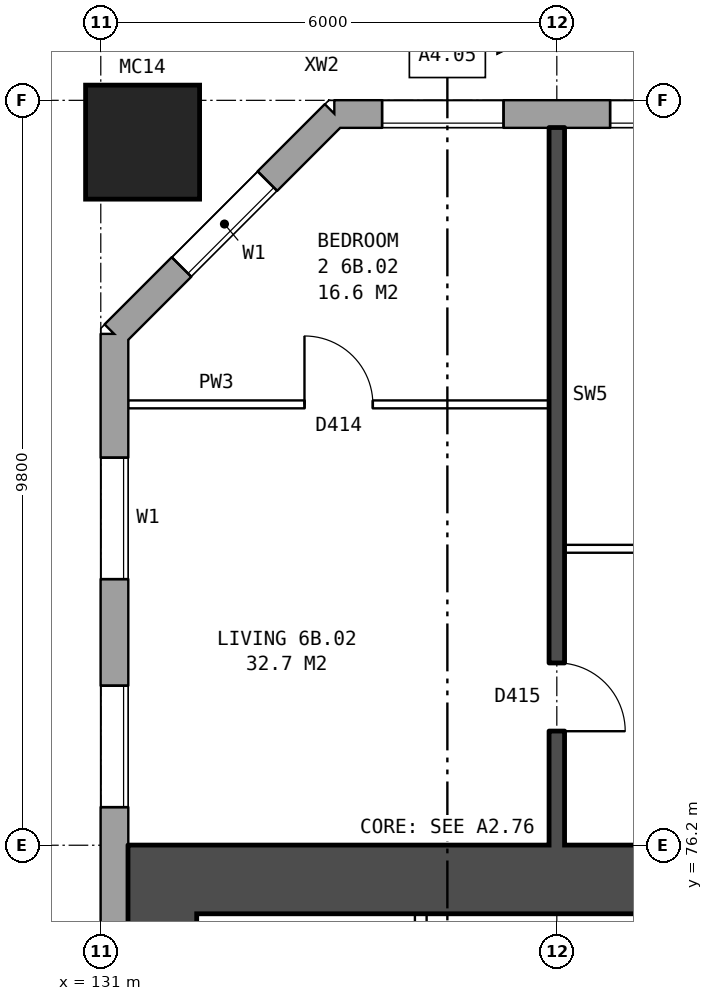
"""IFC4 building model, lengths in metres.
Left out: names, types, materials, properties, quantities, classifications, styles, units other than length and angle.
Written with IfcOpenShell. Run it as: python <this file> out.ifc"""

import sys

from ifc_helpers import new_model, si_unit, direction, frame, frame_2d, origin, origin_2d, place, context, subcontext, project, spatial, rectangle, hollow_rectangle, extrude, element, fill, save


model = new_model("IFC4")
c1 = context("Model", 3, precision=1e-05, world=origin(), true_north=direction((0.0, 1.0)))
c2 = subcontext(c1, "Body", "Model", "MODEL_VIEW")
j1 = project(units=[si_unit("LENGTHUNIT", "METRE"), si_unit("PLANEANGLEUNIT", "RADIAN")], contexts=[c1])
p1 = place(None, origin())
s1 = spatial("IfcSite", under=j1, at=p1, CompositionType="ELEMENT")
p2 = place(p1, origin())
s2 = spatial("IfcBuilding", under=s1, at=p2, CompositionType="ELEMENT")
p3 = place(p2, frame((0.0, 0.0, 25.7)))
s3 = spatial("IfcBuildingStorey", under=s2, at=p3, CompositionType="ELEMENT", Elevation=25.7)
p4 = place(p3, frame((131.55, 85.45, 0.0), z_axis=(0.0, 0.0, 1.0), x_axis=(1.0, 0.0, 0.0)))
e1 = element("IfcColumn", 1, at=p4, inside=s3, PredefinedType="COLUMN", context=c2, shape_type="SweptSolid", body=[
    extrude(hollow_rectangle(XDim=1.5, YDim=1.5, WallThickness=0.08, at=origin_2d()), origin(), (0.0, 0.0, 1.0), 3.1),
])
p5 = place(p3, frame((174.675, 85.82, 0.0), z_axis=(0.0, 0.0, 1.0), x_axis=(-1.0, 0.0, 0.0)))
e2 = element("IfcWall", 2, at=p5, inside=s3, PredefinedType="STANDARD", context=c2, shape_type="SweptSolid", body=[
    extrude(rectangle(XDim=40.601, YDim=0.36, at=frame_2d((20.3, 0.0))), origin(), (0.0, 0.0, 1.0), 2.85),
])
p6 = place(p5, frame((2.375, 0.0, 0.8)))
e3 = element("IfcOpeningElement", 3, at=p6, cuts=e2, PredefinedType="OPENING", context=c2, shape_type="SweptSolid", body=[
    extrude(rectangle(XDim=1.6, YDim=1.8, at=frame_2d((0.8, 0.9))), frame((0.0, 0.19, 0.0), z_axis=(0.0, -1.0, 0.0), x_axis=(1.0, 0.0, 0.0)), (0.0, 0.0, 1.0), 0.38),
])
p7 = place(p5, frame((4.275, 0.0, 0.8)))
e4 = element("IfcOpeningElement", 4, at=p7, cuts=e2, PredefinedType="OPENING", context=c2, shape_type="SweptSolid", body=[
    extrude(rectangle(XDim=1.2, YDim=1.8, at=frame_2d((0.6, 0.9))), frame((0.0, 0.19, 0.0), z_axis=(0.0, -1.0, 0.0), x_axis=(1.0, 0.0, 0.0)), (0.0, 0.0, 1.0), 0.38),
])
p8 = place(p5, frame((8.025, 0.0, 0.8)))
e5 = element("IfcOpeningElement", 5, at=p8, cuts=e2, PredefinedType="OPENING", context=c2, shape_type="SweptSolid", body=[
    extrude(rectangle(XDim=0.8, YDim=0.9, at=frame_2d((0.4, 0.45))), frame((0.0, 0.19, 0.0), z_axis=(0.0, -1.0, 0.0), x_axis=(1.0, 0.0, 0.0)), (0.0, 0.0, 1.0), 0.38),
])
p9 = place(p5, frame((11.375, 0.0, 0.8)))
e6 = element("IfcOpeningElement", 6, at=p9, cuts=e2, PredefinedType="OPENING", context=c2, shape_type="SweptSolid", body=[
    extrude(rectangle(XDim=1.6, YDim=1.8, at=frame_2d((0.8, 0.9))), frame((0.0, 0.19, 0.0), z_axis=(0.0, -1.0, 0.0), x_axis=(1.0, 0.0, 0.0)), (0.0, 0.0, 1.0), 0.38),
])
p10 = place(p5, frame((14.375, 0.0, 0.8)))
e7 = element("IfcOpeningElement", 7, at=p10, cuts=e2, PredefinedType="OPENING", context=c2, shape_type="SweptSolid", body=[
    extrude(rectangle(XDim=1.6, YDim=1.8, at=frame_2d((0.8, 0.9))), frame((0.0, 0.19, 0.0), z_axis=(0.0, -1.0, 0.0), x_axis=(1.0, 0.0, 0.0)), (0.0, 0.0, 1.0), 0.38),
])
p11 = place(p5, frame((17.375, 0.0, 0.8)))
e8 = element("IfcOpeningElement", 8, at=p11, cuts=e2, PredefinedType="OPENING", context=c2, shape_type="SweptSolid", body=[
    extrude(rectangle(XDim=1.6, YDim=1.8, at=frame_2d((0.8, 0.9))), frame((0.0, 0.19, 0.0), z_axis=(0.0, -1.0, 0.0), x_axis=(1.0, 0.0, 0.0)), (0.0, 0.0, 1.0), 0.38),
])
p12 = place(p5, frame((20.375, 0.0, 0.8)))
e9 = element("IfcOpeningElement", 9, at=p12, cuts=e2, PredefinedType="OPENING", context=c2, shape_type="SweptSolid", body=[
    extrude(rectangle(XDim=1.6, YDim=1.8, at=frame_2d((0.8, 0.9))), frame((0.0, 0.19, 0.0), z_axis=(0.0, -1.0, 0.0), x_axis=(1.0, 0.0, 0.0)), (0.0, 0.0, 1.0), 0.38),
])
p13 = place(p5, frame((23.375, 0.0, 0.8)))
e10 = element("IfcOpeningElement", 10, at=p13, cuts=e2, PredefinedType="OPENING", context=c2, shape_type="SweptSolid", body=[
    extrude(rectangle(XDim=1.6, YDim=1.8, at=frame_2d((0.8, 0.9))), frame((0.0, 0.19, 0.0), z_axis=(0.0, -1.0, 0.0), x_axis=(1.0, 0.0, 0.0)), (0.0, 0.0, 1.0), 0.38),
])
p14 = place(p5, frame((26.375, 0.0, 0.8)))
e11 = element("IfcOpeningElement", 11, at=p14, cuts=e2, PredefinedType="OPENING", context=c2, shape_type="SweptSolid", body=[
    extrude(rectangle(XDim=1.6, YDim=1.8, at=frame_2d((0.8, 0.9))), frame((0.0, 0.19, 0.0), z_axis=(0.0, -1.0, 0.0), x_axis=(1.0, 0.0, 0.0)), (0.0, 0.0, 1.0), 0.38),
])
p15 = place(p5, frame((29.375, 0.0, 0.8)))
e12 = element("IfcOpeningElement", 12, at=p15, cuts=e2, PredefinedType="OPENING", context=c2, shape_type="SweptSolid", body=[
    extrude(rectangle(XDim=1.6, YDim=1.8, at=frame_2d((0.8, 0.9))), frame((0.0, 0.19, 0.0), z_axis=(0.0, -1.0, 0.0), x_axis=(1.0, 0.0, 0.0)), (0.0, 0.0, 1.0), 0.38),
])
p16 = place(p5, frame((31.875, 0.0, 0.8)))
e13 = element("IfcOpeningElement", 13, at=p16, cuts=e2, PredefinedType="OPENING", context=c2, shape_type="SweptSolid", body=[
    extrude(rectangle(XDim=0.6, YDim=0.9, at=frame_2d((0.3, 0.45))), frame((0.0, 0.19, 0.0), z_axis=(0.0, -1.0, 0.0), x_axis=(1.0, 0.0, 0.0)), (0.0, 0.0, 1.0), 0.38),
])
p17 = place(p5, frame((35.375, 0.0, 0.8)))
e14 = element("IfcOpeningElement", 14, at=p17, cuts=e2, PredefinedType="OPENING", context=c2, shape_type="SweptSolid", body=[
    extrude(rectangle(XDim=1.6, YDim=1.8, at=frame_2d((0.8, 0.9))), frame((0.0, 0.19, 0.0), z_axis=(0.0, -1.0, 0.0), x_axis=(1.0, 0.0, 0.0)), (0.0, 0.0, 1.0), 0.38),
])
p18 = place(p5, frame((38.375, 0.0, 0.8)))
e15 = element("IfcOpeningElement", 15, at=p18, cuts=e2, PredefinedType="OPENING", context=c2, shape_type="SweptSolid", body=[
    extrude(rectangle(XDim=1.6, YDim=1.8, at=frame_2d((0.8, 0.9))), frame((0.0, 0.19, 0.0), z_axis=(0.0, -1.0, 0.0), x_axis=(1.0, 0.0, 0.0)), (0.0, 0.0, 1.0), 0.38),
])
p19 = place(p5, frame((5.775, 0.0, 1.7)))
e16 = element("IfcOpeningElement", 16, at=p19, cuts=e2, PredefinedType="OPENING", context=c2, shape_type="SweptSolid", body=[
    extrude(rectangle(XDim=1.0, YDim=0.9, at=frame_2d((0.5, 0.45))), frame((0.0, 0.19, 0.0), z_axis=(0.0, -1.0, 0.0), x_axis=(1.0, 0.0, 0.0)), (0.0, 0.0, 1.0), 0.38),
])
p20 = place(p5, frame((9.125, 0.0, 0.8)))
e17 = element("IfcOpeningElement", 17, at=p20, cuts=e2, PredefinedType="OPENING", context=c2, shape_type="SweptSolid", body=[
    extrude(rectangle(XDim=1.2, YDim=1.8, at=frame_2d((0.6, 0.9))), frame((0.0, 0.19, 0.0), z_axis=(0.0, -1.0, 0.0), x_axis=(1.0, 0.0, 0.0)), (0.0, 0.0, 1.0), 0.38),
])
p21 = place(p5, frame((33.825, 0.0, 1.7)))
e18 = element("IfcOpeningElement", 18, at=p21, cuts=e2, PredefinedType="OPENING", context=c2, shape_type="SweptSolid", body=[
    extrude(rectangle(XDim=1.2, YDim=0.9, at=frame_2d((0.6, 0.45))), frame((0.0, 0.19, 0.0), z_axis=(0.0, -1.0, 0.0), x_axis=(1.0, 0.0, 0.0)), (0.0, 0.0, 1.0), 0.38),
])
p22 = place(p3, frame((134.075, 85.82, 0.0), z_axis=(0.0, 0.0, 1.0), x_axis=(-0.707106781187, -0.707106781187, 0.0)))
e19 = element("IfcWall", 19, at=p22, inside=s3, PredefinedType="STANDARD", context=c2, shape_type="SweptSolid", body=[
    extrude(rectangle(XDim=4.094, YDim=0.36, at=frame_2d((2.047, 0.0))), origin(), (0.0, 0.0, 1.0), 2.85),
])
p23 = place(p22, frame((1.247, 0.0, 0.8)))
e20 = element("IfcOpeningElement", 20, at=p23, cuts=e19, PredefinedType="OPENING", context=c2, shape_type="SweptSolid", body=[
    extrude(rectangle(XDim=1.6, YDim=1.8, at=frame_2d((0.8, 0.9))), frame((0.0, 0.19, 0.0), z_axis=(0.0, -1.0, 0.0), x_axis=(1.0, 0.0, 0.0)), (0.0, 0.0, 1.0), 0.38),
])
p24 = place(p3, frame((131.18, 82.925, 0.0), z_axis=(0.0, 0.0, 1.0), x_axis=(0.0, -1.0, 0.0)))
e21 = element("IfcWall", 21, at=p24, inside=s3, PredefinedType="STANDARD", context=c2, shape_type="SweptSolid", body=[
    extrude(rectangle(XDim=25.851, YDim=0.36, at=frame_2d((12.925, 0.0))), origin(), (0.0, 0.0, 1.0), 2.85),
])
p25 = place(p24, frame((1.625, 0.0, 0.8)))
e22 = element("IfcOpeningElement", 22, at=p25, cuts=e21, PredefinedType="OPENING", context=c2, shape_type="SweptSolid", body=[
    extrude(rectangle(XDim=1.6, YDim=1.8, at=frame_2d((0.8, 0.9))), frame((0.0, 0.19, 0.0), z_axis=(0.0, -1.0, 0.0), x_axis=(1.0, 0.0, 0.0)), (0.0, 0.0, 1.0), 0.38),
])
p26 = place(p24, frame((4.625, 0.0, 0.8)))
e23 = element("IfcOpeningElement", 23, at=p26, cuts=e21, PredefinedType="OPENING", context=c2, shape_type="SweptSolid", body=[
    extrude(rectangle(XDim=1.6, YDim=1.8, at=frame_2d((0.8, 0.9))), frame((0.0, 0.19, 0.0), z_axis=(0.0, -1.0, 0.0), x_axis=(1.0, 0.0, 0.0)), (0.0, 0.0, 1.0), 0.38),
])
p27 = place(p24, frame((19.625, 0.0, 0.8)))
e24 = element("IfcOpeningElement", 24, at=p27, cuts=e21, PredefinedType="OPENING", context=c2, shape_type="SweptSolid", body=[
    extrude(rectangle(XDim=1.6, YDim=1.8, at=frame_2d((0.8, 0.9))), frame((0.0, 0.19, 0.0), z_axis=(0.0, -1.0, 0.0), x_axis=(1.0, 0.0, 0.0)), (0.0, 0.0, 1.0), 0.38),
])
p28 = place(p24, frame((22.625, 0.0, 0.8)))
e25 = element("IfcOpeningElement", 25, at=p28, cuts=e21, PredefinedType="OPENING", context=c2, shape_type="SweptSolid", body=[
    extrude(rectangle(XDim=1.6, YDim=1.8, at=frame_2d((0.8, 0.9))), frame((0.0, 0.19, 0.0), z_axis=(0.0, -1.0, 0.0), x_axis=(1.0, 0.0, 0.0)), (0.0, 0.0, 1.0), 0.38),
])
p29 = place(p3, frame((131.81, 64.7, 0.0), z_axis=(0.0, 0.0, 1.0), x_axis=(0.0, 1.0, 0.0)))
e26 = element("IfcWall", 26, at=p29, inside=s3, PredefinedType="SHEAR", context=c2, shape_type="SweptSolid", body=[
    extrude(rectangle(XDim=10.6, YDim=0.9, at=frame_2d((5.3, 0.0))), origin(), (0.0, 0.0, 1.0), 2.85),
])
p30 = place(p3, frame((139.76, 75.75, 0.0), z_axis=(0.0, 0.0, 1.0), x_axis=(-1.0, 0.0, 0.0)))
e27 = element("IfcWall", 27, at=p30, inside=s3, PredefinedType="SHEAR", context=c2, shape_type="SweptSolid", body=[
    extrude(rectangle(XDim=8.4, YDim=0.9, at=frame_2d((4.2, 0.0))), origin(), (0.0, 0.0, 1.0), 2.85),
])
p31 = place(p3, frame((135.21, 71.45, 0.0), z_axis=(0.0, 0.0, 1.0), x_axis=(0.0, 1.0, 0.0)))
e28 = element("IfcWall", 28, at=p31, inside=s3, PredefinedType="PARTITIONING", context=c2, shape_type="SweptSolid", body=[
    extrude(rectangle(XDim=3.85, YDim=0.15, at=frame_2d((1.925, 0.0))), origin(), (0.0, 0.0, 1.0), 2.85),
])
p32 = place(p31, frame((0.45, 0.0, 0.0)))
e29 = element("IfcOpeningElement", 29, at=p32, cuts=e28, PredefinedType="OPENING", context=c2, shape_type="SweptSolid", body=[
    extrude(rectangle(XDim=1.1, YDim=2.1, at=frame_2d((0.55, 1.05))), frame((0.0, 0.085, 0.0), z_axis=(0.0, -1.0, 0.0), x_axis=(1.0, 0.0, 0.0)), (0.0, 0.0, 1.0), 0.17),
])
p33 = place(p3, frame((137.1, 80.1, 0.0), z_axis=(0.0, 0.0, 1.0), x_axis=(1.0, 0.0, 0.0)))
e30 = element("IfcWall", 30, at=p33, inside=s3, PredefinedType="PARTITIONING", context=c2, shape_type="SweptSolid", body=[
    extrude(rectangle(XDim=5.8, YDim=0.1, at=frame_2d((2.9, 0.0))), origin(), (0.0, 0.0, 1.0), 2.85),
])
p34 = place(p33, frame((1.3, 0.0, 0.0)))
e31 = element("IfcOpeningElement", 31, at=p34, cuts=e30, PredefinedType="OPENING", context=c2, shape_type="SweptSolid", body=[
    extrude(rectangle(XDim=0.9, YDim=2.1, at=frame_2d((0.45, 1.05))), frame((0.0, 0.06, 0.0), z_axis=(0.0, -1.0, 0.0), x_axis=(1.0, 0.0, 0.0)), (0.0, 0.0, 1.0), 0.12),
])
p35 = place(p33, frame((4.2, 0.0, 0.0)))
e32 = element("IfcOpeningElement", 32, at=p35, cuts=e30, PredefinedType="OPENING", context=c2, shape_type="SweptSolid", body=[
    extrude(rectangle(XDim=0.9, YDim=2.1, at=frame_2d((0.45, 1.05))), frame((0.0, 0.06, 0.0), z_axis=(0.0, -1.0, 0.0), x_axis=(1.0, 0.0, 0.0)), (0.0, 0.0, 1.0), 0.12),
])
p36 = place(p3, frame((131.36, 82.0, 0.0), z_axis=(0.0, 0.0, 1.0), x_axis=(1.0, 0.0, 0.0)))
e33 = element("IfcWall", 33, at=p36, inside=s3, PredefinedType="PARTITIONING", context=c2, shape_type="SweptSolid", body=[
    extrude(rectangle(XDim=5.54, YDim=0.1, at=frame_2d((2.77, 0.0))), origin(), (0.0, 0.0, 1.0), 2.85),
])
p37 = place(p36, frame((2.32, 0.0, 0.0)))
e34 = element("IfcOpeningElement", 34, at=p37, cuts=e33, PredefinedType="OPENING", context=c2, shape_type="SweptSolid", body=[
    extrude(rectangle(XDim=0.9, YDim=2.1, at=frame_2d((0.45, 1.05))), frame((0.0, 0.06, 0.0), z_axis=(0.0, -1.0, 0.0), x_axis=(1.0, 0.0, 0.0)), (0.0, 0.0, 1.0), 0.12),
])
p38 = place(p3, frame((137.0, 76.2, 0.0), z_axis=(0.0, 0.0, 1.0), x_axis=(0.0, 1.0, 0.0)))
e35 = element("IfcWall", 35, at=p38, inside=s3, PredefinedType="SOLIDWALL", context=c2, shape_type="SweptSolid", body=[
    extrude(rectangle(XDim=9.44, YDim=0.2, at=frame_2d((4.72, 0.0))), origin(), (0.0, 0.0, 1.0), 2.85),
])
p39 = place(p38, frame((1.5, 0.0, 0.0)))
e36 = element("IfcOpeningElement", 36, at=p39, cuts=e35, PredefinedType="OPENING", context=c2, shape_type="SweptSolid", body=[
    extrude(rectangle(XDim=0.9, YDim=2.1, at=frame_2d((0.45, 1.05))), frame((0.0, 0.11, 0.0), z_axis=(0.0, -1.0, 0.0), x_axis=(1.0, 0.0, 0.0)), (0.0, 0.0, 1.0), 0.22),
])
p40 = place(p17, origin())
e37 = element("IfcWindow", 37, at=p40, inside=s3, PartitioningType="SINGLE_PANEL", PredefinedType="WINDOW", context=c2, shape_type="SweptSolid", body=[
    extrude(rectangle(XDim=1.6, YDim=1.8, at=frame_2d((0.8, 0.9))), frame((0.0, 0.15, 0.0), z_axis=(0.0, -1.0, 0.0), x_axis=(1.0, 0.0, 0.0)), (0.0, 0.0, 1.0), 0.06),
])
fill(e14, e37)
p41 = place(p18, origin())
e38 = element("IfcWindow", 38, at=p41, inside=s3, PartitioningType="SINGLE_PANEL", PredefinedType="WINDOW", context=c2, shape_type="SweptSolid", body=[
    extrude(rectangle(XDim=1.6, YDim=1.8, at=frame_2d((0.8, 0.9))), frame((0.0, 0.15, 0.0), z_axis=(0.0, -1.0, 0.0), x_axis=(1.0, 0.0, 0.0)), (0.0, 0.0, 1.0), 0.06),
])
fill(e15, e38)
p42 = place(p23, origin())
e39 = element("IfcWindow", 39, at=p42, inside=s3, PartitioningType="SINGLE_PANEL", PredefinedType="WINDOW", context=c2, shape_type="SweptSolid", body=[
    extrude(rectangle(XDim=1.6, YDim=1.8, at=frame_2d((0.8, 0.9))), frame((0.0, 0.15, 0.0), z_axis=(0.0, -1.0, 0.0), x_axis=(1.0, 0.0, 0.0)), (0.0, 0.0, 1.0), 0.06),
])
fill(e20, e39)
p43 = place(p25, origin())
e40 = element("IfcWindow", 40, at=p43, inside=s3, PartitioningType="SINGLE_PANEL", PredefinedType="WINDOW", context=c2, shape_type="SweptSolid", body=[
    extrude(rectangle(XDim=1.6, YDim=1.8, at=frame_2d((0.8, 0.9))), frame((0.0, 0.15, 0.0), z_axis=(0.0, -1.0, 0.0), x_axis=(1.0, 0.0, 0.0)), (0.0, 0.0, 1.0), 0.06),
])
fill(e22, e40)
p44 = place(p26, origin())
e41 = element("IfcWindow", 41, at=p44, inside=s3, PartitioningType="SINGLE_PANEL", PredefinedType="WINDOW", context=c2, shape_type="SweptSolid", body=[
    extrude(rectangle(XDim=1.6, YDim=1.8, at=frame_2d((0.8, 0.9))), frame((0.0, 0.15, 0.0), z_axis=(0.0, -1.0, 0.0), x_axis=(1.0, 0.0, 0.0)), (0.0, 0.0, 1.0), 0.06),
])
fill(e23, e41)
p45 = place(p37, origin())
e42 = element("IfcDoor", 42, at=p45, inside=s3, OperationType="SINGLE_SWING_LEFT", PredefinedType="DOOR", context=c2, shape_type="SweptSolid", body=[
    extrude(rectangle(XDim=0.9, YDim=2.1, at=frame_2d((0.45, 1.05))), frame((0.0, 0.025, 0.0), z_axis=(0.0, -1.0, 0.0), x_axis=(1.0, 0.0, 0.0)), (0.0, 0.0, 1.0), 0.05),
])
fill(e34, e42)
p46 = place(p39, frame((0.9, 0.0, 0.0), z_axis=(0.0, 0.0, 1.0), x_axis=(-1.0, 0.0, 0.0)))
e43 = element("IfcDoor", 43, at=p46, inside=s3, OperationType="SINGLE_SWING_RIGHT", PredefinedType="DOOR", context=c2, shape_type="SweptSolid", body=[
    extrude(rectangle(XDim=0.9, YDim=2.1, at=frame_2d((0.45, 1.05))), frame((0.0, 0.025, 0.0), z_axis=(0.0, -1.0, 0.0), x_axis=(1.0, 0.0, 0.0)), (0.0, 0.0, 1.0), 0.05),
])
fill(e36, e43)
save(model, sys.argv[1])
